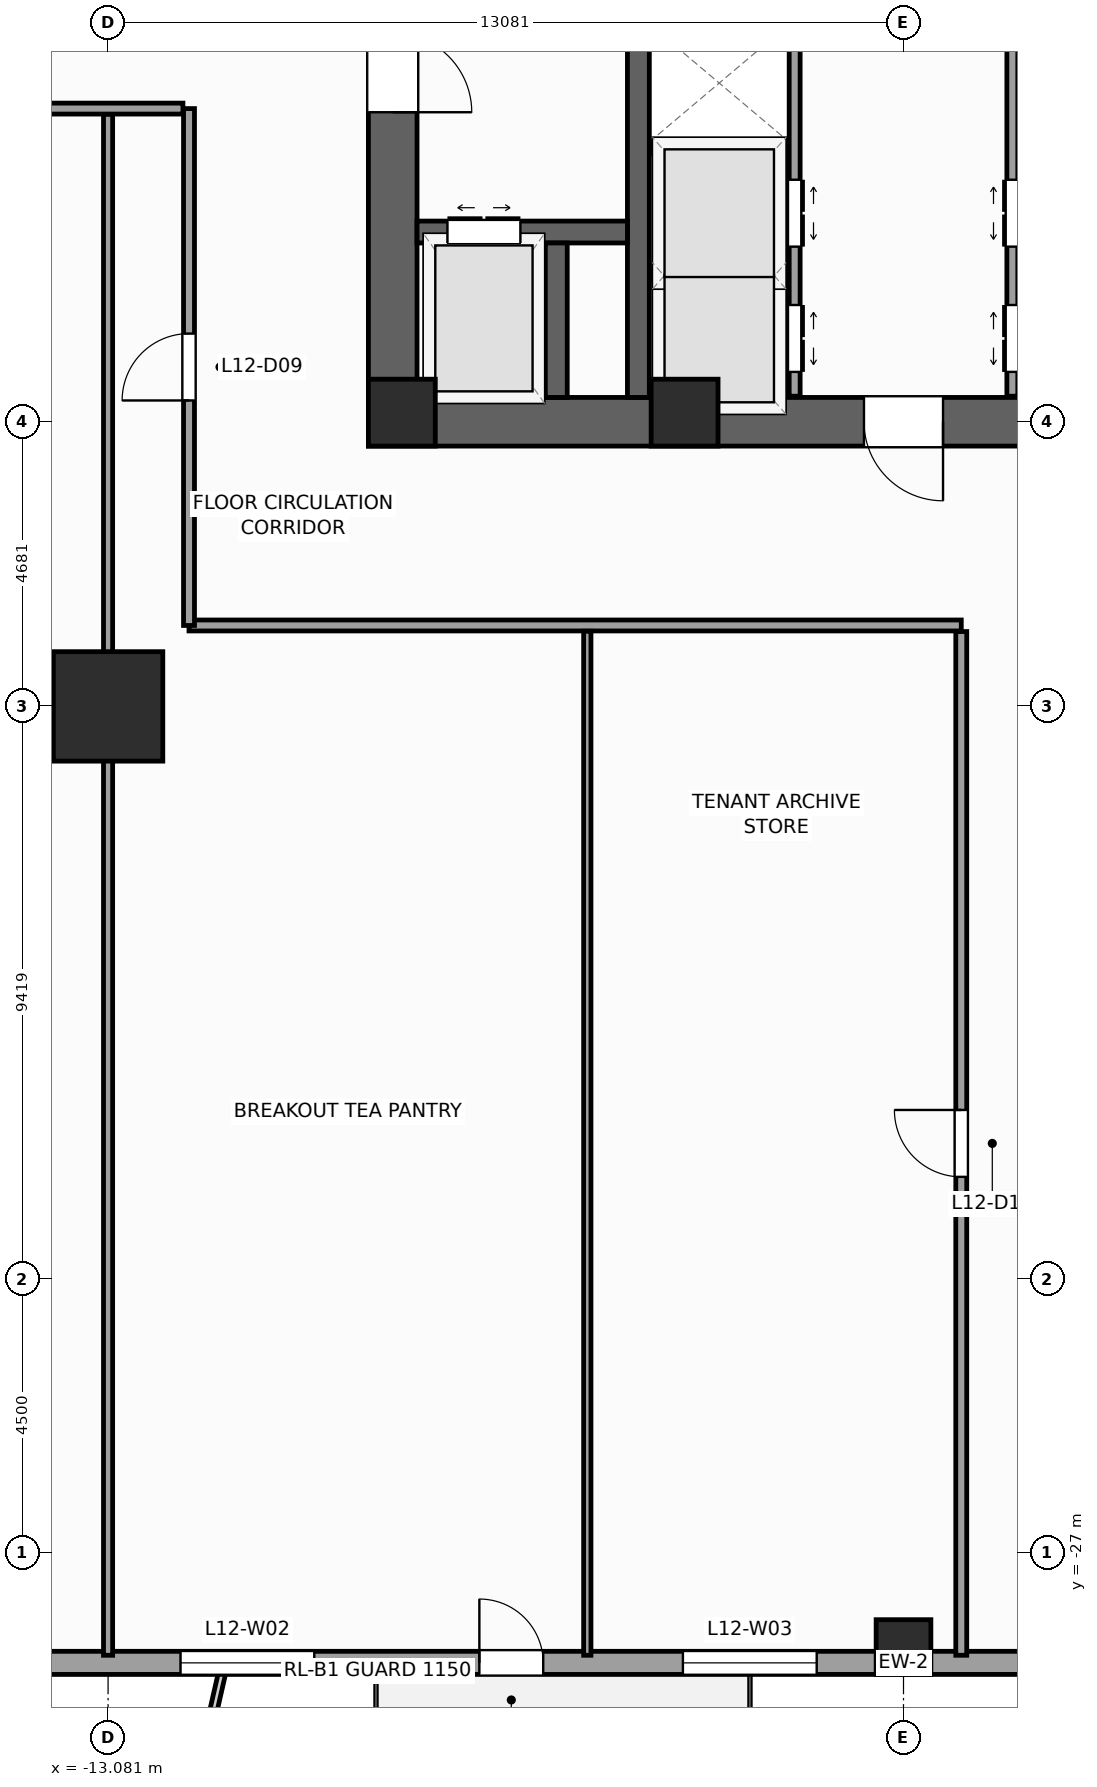
"""IFC4 building model, lengths in metres.
Left out: names, types, materials, properties, quantities, classifications, styles, units other than length and angle.
Written with IfcOpenShell. Run it as: python <this file> out.ifc"""

import sys

from ifc_helpers import new_model, si_unit, direction, frame, frame_2d, origin, origin_2d, place, context, subcontext, project, spatial, rectangle, extrude, source, transform, mapped, element, fill, save


model = new_model("IFC4")
c1 = context("Model", 3, precision=1e-05, world=origin(), true_north=direction((0.0, 1.0)))
c2 = subcontext(c1, "Body", "Model", "MODEL_VIEW")
j1 = project(units=[si_unit("LENGTHUNIT", "METRE"), si_unit("PLANEANGLEUNIT", "RADIAN")], contexts=[c1])
p1 = place(None, origin())
s1 = spatial("IfcSite", under=j1, at=p1, CompositionType="ELEMENT")
p2 = place(p1, origin())
s2 = spatial("IfcBuilding", under=s1, at=p2, CompositionType="ELEMENT")
p3 = place(p2, frame((0.0, 0.0, 54.0)))
s3 = spatial("IfcBuildingStorey", under=s2, at=p3, CompositionType="ELEMENT", Elevation=54.0)
p4 = place(p3, frame((-8.8, -8.4, 0.0), z_axis=(0.0, 0.0, 1.0), x_axis=(1.0, 0.0, 0.0)))
e1 = element("IfcWall", 1, at=p4, inside=s3, PredefinedType="SHEAR", context=c2, shape_type="SweptSolid", body=[
    extrude(rectangle(XDim=17.6, YDim=0.8, at=frame_2d((8.8, 0.0))), origin(), (0.0, 0.0, 1.0), 4.0),
])
p5 = place(p4, frame((8.15, 0.0, 0.0)))
e2 = element("IfcOpeningElement", 2, at=p5, cuts=e1, PredefinedType="OPENING", context=c2, shape_type="SweptSolid", body=[
    extrude(rectangle(XDim=1.3, YDim=2.2, at=frame_2d((0.65, 1.1))), frame((0.0, 0.41, 0.0), z_axis=(0.0, -1.0, 0.0), x_axis=(1.0, 0.0, 0.0)), (0.0, 0.0, 1.0), 0.82),
])
p6 = place(p3, frame((-8.4, -8.0, 0.0), z_axis=(0.0, 0.0, 1.0), x_axis=(0.0, 1.0, 0.0)))
e3 = element("IfcWall", 3, at=p6, inside=s3, PredefinedType="SHEAR", context=c2, shape_type="SweptSolid", body=[
    extrude(rectangle(XDim=16.0, YDim=0.8, at=frame_2d((8.0, 0.0))), origin(), (0.0, 0.0, 1.0), 4.0),
])
p7 = place(p6, frame((4.69, 0.0, 0.0)))
e4 = element("IfcOpeningElement", 4, at=p7, cuts=e3, PredefinedType="OPENING", context=c2, shape_type="SweptSolid", body=[
    extrude(rectangle(XDim=1.3, YDim=2.2, at=frame_2d((0.65, 1.1))), frame((0.0, 0.41, 0.0), z_axis=(0.0, -1.0, 0.0), x_axis=(1.0, 0.0, 0.0)), (0.0, 0.0, 1.0), 0.82),
])
p8 = place(p3, frame((-4.36, -8.0, 0.0), z_axis=(0.0, 0.0, 1.0), x_axis=(0.0, 1.0, 0.0)))
e5 = element("IfcWall", 5, at=p8, inside=s3, PredefinedType="SHEAR", context=c2, shape_type="SweptSolid", body=[
    extrude(rectangle(XDim=16.0, YDim=0.36, at=frame_2d((8.0, 0.0))), origin(), (0.0, 0.0, 1.0), 4.0),
])
p9 = place(p3, frame((-8.0, -5.28, 0.0), z_axis=(0.0, 0.0, 1.0), x_axis=(1.0, 0.0, 0.0)))
e6 = element("IfcWall", 6, at=p9, inside=s3, PredefinedType="SHEAR", context=c2, shape_type="SweptSolid", body=[
    extrude(rectangle(XDim=3.46, YDim=0.36, at=frame_2d((1.73, 0.0))), origin(), (0.0, 0.0, 1.0), 4.0),
])
p10 = place(p9, frame((0.5, 0.0, 0.0)))
e7 = element("IfcOpeningElement", 7, at=p10, cuts=e6, PredefinedType="OPENING", context=c2, shape_type="SweptSolid", body=[
    extrude(rectangle(XDim=1.2, YDim=2.25, at=frame_2d((0.6, 1.125))), frame((0.0, 0.19, 0.0), z_axis=(0.0, -1.0, 0.0), x_axis=(1.0, 0.0, 0.0)), (0.0, 0.0, 1.0), 0.38),
])
p11 = place(p3, frame((-5.71, -8.0, 0.0), z_axis=(0.0, 0.0, 1.0), x_axis=(0.0, 1.0, 0.0)))
e8 = element("IfcWall", 8, at=p11, inside=s3, PredefinedType="SHEAR", context=c2, shape_type="SweptSolid", body=[
    extrude(rectangle(XDim=2.54, YDim=0.36, at=frame_2d((1.27, 0.0))), origin(), (0.0, 0.0, 1.0), 4.0),
])
m1 = source(origin(), c2, "Body", "SweptSolid", [
    extrude(rectangle(XDim=1.1, YDim=1.1, at=origin_2d()), origin(), (0.0, 0.0, 1.0), 4.0),
])
for number, where, z_axis, x_axis in (
    (9, (-8.25, -8.25, 0.0), (0.0, 0.0, 1.0), (1.0, 0.0, 0.0)),
    (10, (-3.6, -8.25, 0.0), (0.0, 0.0, 1.0), (1.0, 0.0, 0.0)),
):
    element("IfcColumn", number, at=place(p3, frame(where, z_axis=z_axis, x_axis=x_axis)), inside=s3, PredefinedType="PILASTER", context=c2, shape_type="MappedRepresentation", body=[
        mapped(m1, transform((0.0, 0.0, 0.0), scale=1.0)),
    ])
m2 = source(origin(), c2, "Body", "SweptSolid", [
    extrude(rectangle(XDim=1.8, YDim=1.8, at=origin_2d()), origin(), (0.0, 0.0, 1.0), 4.0),
])
p12 = place(p3, frame((-13.081, -13.081, 0.0), z_axis=(0.0, 0.0, 1.0), x_axis=(1.0, 0.0, 0.0)))
e11 = element("IfcColumn", 11, at=p12, inside=s3, PredefinedType="COLUMN", context=c2, shape_type="MappedRepresentation", body=[
    mapped(m2, transform((0.0, 0.0, 0.0), scale=1.0)),
])
m3 = source(origin(), c2, "Body", "SweptSolid", [
    extrude(rectangle(XDim=0.9, YDim=0.9, at=origin_2d()), origin(), (0.0, 0.0, 1.0), 4.0),
])
p13 = place(p3, frame((0.0, -28.55, 0.0), z_axis=(0.0, 0.0, 1.0), x_axis=(1.0, 0.0, 0.0)))
e12 = element("IfcColumn", 12, at=p13, inside=s3, PredefinedType="COLUMN", context=c2, shape_type="MappedRepresentation", body=[
    mapped(m3, transform((0.0, 0.0, 0.0), scale=1.0)),
])
p14 = place(p3, frame((-25.69, -28.81, 0.0), z_axis=(0.0, 0.0, 1.0), x_axis=(1.0, 0.0, 0.0)))
e13 = element("IfcWall", 13, at=p14, inside=s3, PredefinedType="STANDARD", context=c2, shape_type="SweptSolid", body=[
    extrude(rectangle(XDim=51.38, YDim=0.38, at=frame_2d((25.69, 0.0))), origin(), (0.0, 0.0, 1.0), 3.12),
])
p15 = place(p14, frame((18.715, 0.0, 0.0)))
e14 = element("IfcOpeningElement", 14, at=p15, cuts=e13, PredefinedType="OPENING", context=c2, shape_type="SweptSolid", body=[
    extrude(rectangle(XDim=1.05, YDim=2.25, at=frame_2d((0.525, 1.125))), frame((0.0, 0.2, 0.0), z_axis=(0.0, -1.0, 0.0), x_axis=(1.0, 0.0, 0.0)), (0.0, 0.0, 1.0), 0.4),
])
p16 = place(p14, frame((5.466, 0.0, 0.49)))
e15 = element("IfcOpeningElement", 15, at=p16, cuts=e13, PredefinedType="OPENING", context=c2, shape_type="SweptSolid", body=[
    extrude(rectangle(XDim=1.4, YDim=2.4, at=frame_2d((0.7, 1.2))), frame((0.0, 0.2, 0.0), z_axis=(0.0, -1.0, 0.0), x_axis=(1.0, 0.0, 0.0)), (0.0, 0.0, 1.0), 0.4),
])
p17 = place(p14, frame((13.8, 0.0, 0.49)))
e16 = element("IfcOpeningElement", 16, at=p17, cuts=e13, PredefinedType="OPENING", context=c2, shape_type="SweptSolid", body=[
    extrude(rectangle(XDim=2.2, YDim=2.4, at=frame_2d((1.1, 1.2))), frame((0.0, 0.2, 0.0), z_axis=(0.0, -1.0, 0.0), x_axis=(1.0, 0.0, 0.0)), (0.0, 0.0, 1.0), 0.4),
])
p18 = place(p14, frame((22.062, 0.0, 0.49)))
e17 = element("IfcOpeningElement", 17, at=p18, cuts=e13, PredefinedType="OPENING", context=c2, shape_type="SweptSolid", body=[
    extrude(rectangle(XDim=2.2, YDim=2.4, at=frame_2d((1.1, 1.2))), frame((0.0, 0.2, 0.0), z_axis=(0.0, -1.0, 0.0), x_axis=(1.0, 0.0, 0.0)), (0.0, 0.0, 1.0), 0.4),
])
p19 = place(p14, frame((33.838, 0.0, 0.49)))
e18 = element("IfcOpeningElement", 18, at=p19, cuts=e13, PredefinedType="OPENING", context=c2, shape_type="SweptSolid", body=[
    extrude(rectangle(XDim=2.2, YDim=2.4, at=frame_2d((1.1, 1.2))), frame((0.0, 0.2, 0.0), z_axis=(0.0, -1.0, 0.0), x_axis=(1.0, 0.0, 0.0)), (0.0, 0.0, 1.0), 0.4),
])
p20 = place(p14, frame((43.487, 0.0, 0.49)))
e19 = element("IfcOpeningElement", 19, at=p20, cuts=e13, PredefinedType="OPENING", context=c2, shape_type="SweptSolid", body=[
    extrude(rectangle(XDim=1.4, YDim=2.4, at=frame_2d((0.7, 1.2))), frame((0.0, 0.2, 0.0), z_axis=(0.0, -1.0, 0.0), x_axis=(1.0, 0.0, 0.0)), (0.0, 0.0, 1.0), 0.4),
])
p21 = place(p3, frame((-1.79, -7.98, 0.0), z_axis=(0.0, 0.0, 1.0), x_axis=(0.0, 1.0, 0.0)))
e20 = element("IfcWall", 20, at=p21, inside=s3, PredefinedType="PARTITIONING", context=c2, shape_type="SweptSolid", body=[
    extrude(rectangle(XDim=12.38, YDim=0.18, at=frame_2d((6.19, 0.0))), origin(), (0.0, 0.0, 1.0), 3.72),
])
p22 = place(p21, frame((0.4, 0.0, 0.0)))
e21 = element("IfcOpeningElement", 21, at=p22, cuts=e20, PredefinedType="OPENING", context=c2, shape_type="SweptSolid", body=[
    extrude(rectangle(XDim=1.1, YDim=2.2, at=frame_2d((0.55, 1.1))), frame((0.0, 0.1, 0.0), z_axis=(0.0, -1.0, 0.0), x_axis=(1.0, 0.0, 0.0)), (0.0, 0.0, 1.0), 0.2),
])
p23 = place(p21, frame((2.46, 0.0, 0.0)))
e22 = element("IfcOpeningElement", 22, at=p23, cuts=e20, PredefinedType="OPENING", context=c2, shape_type="SweptSolid", body=[
    extrude(rectangle(XDim=1.1, YDim=2.2, at=frame_2d((0.55, 1.1))), frame((0.0, 0.1, 0.0), z_axis=(0.0, -1.0, 0.0), x_axis=(1.0, 0.0, 0.0)), (0.0, 0.0, 1.0), 0.2),
])
p24 = place(p3, frame((1.79, -7.98, 0.0), z_axis=(0.0, 0.0, 1.0), x_axis=(0.0, 1.0, 0.0)))
e23 = element("IfcWall", 23, at=p24, inside=s3, PredefinedType="PARTITIONING", context=c2, shape_type="SweptSolid", body=[
    extrude(rectangle(XDim=12.38, YDim=0.18, at=frame_2d((6.19, 0.0))), origin(), (0.0, 0.0, 1.0), 3.72),
])
p25 = place(p24, frame((0.4, 0.0, 0.0)))
e24 = element("IfcOpeningElement", 24, at=p25, cuts=e23, PredefinedType="OPENING", context=c2, shape_type="SweptSolid", body=[
    extrude(rectangle(XDim=1.1, YDim=2.2, at=frame_2d((0.55, 1.1))), frame((0.0, 0.1, 0.0), z_axis=(0.0, -1.0, 0.0), x_axis=(1.0, 0.0, 0.0)), (0.0, 0.0, 1.0), 0.2),
])
p26 = place(p24, frame((2.46, 0.0, 0.0)))
e25 = element("IfcOpeningElement", 25, at=p26, cuts=e23, PredefinedType="OPENING", context=c2, shape_type="SweptSolid", body=[
    extrude(rectangle(XDim=1.1, YDim=2.2, at=frame_2d((0.55, 1.1))), frame((0.0, 0.1, 0.0), z_axis=(0.0, -1.0, 0.0), x_axis=(1.0, 0.0, 0.0)), (0.0, 0.0, 1.0), 0.2),
])
p27 = place(p3, frame((-4.17, -3.9, 0.0), z_axis=(0.0, 0.0, 1.0), x_axis=(1.0, 0.0, 0.0)))
e26 = element("IfcWall", 26, at=p27, inside=s3, PredefinedType="PARTITIONING", context=c2, shape_type="SweptSolid", body=[
    extrude(rectangle(XDim=2.28, YDim=0.18, at=frame_2d((1.14, 0.0))), origin(), (0.0, 0.0, 1.0), 3.72),
])
p28 = place(p3, frame((-4.16, -6.0, 0.0), z_axis=(0.0, 0.0, 1.0), x_axis=(1.0, 0.0, 0.0)))
e27 = element("IfcWall", 27, at=p28, inside=s3, PredefinedType="PARTITIONING", context=c2, shape_type="SweptSolid", body=[
    extrude(rectangle(XDim=2.26, YDim=0.12, at=frame_2d((1.13, 0.0))), origin(), (0.0, 0.0, 1.0), 3.72),
])
p29 = place(p3, frame((-11.75, -11.75, 0.0), z_axis=(0.0, 0.0, 1.0), x_axis=(1.0, 0.0, 0.0)))
e28 = element("IfcWall", 28, at=p29, inside=s3, PredefinedType="PARTITIONING", context=c2, shape_type="SweptSolid", body=[
    extrude(rectangle(XDim=12.7, YDim=0.18, at=frame_2d((6.35, 0.0))), origin(), (0.0, 0.0, 1.0), 3.72),
])
p30 = place(p3, frame((-11.75, -11.75, 0.0), z_axis=(0.0, 0.0, 1.0), x_axis=(0.0, 1.0, 0.0)))
e29 = element("IfcWall", 29, at=p30, inside=s3, PredefinedType="PARTITIONING", context=c2, shape_type="SweptSolid", body=[
    extrude(rectangle(XDim=8.5, YDim=0.18, at=frame_2d((4.25, 0.0))), origin(), (0.0, 0.0, 1.0), 3.72),
])
p31 = place(p30, frame((3.7, 0.0, 0.0)))
e30 = element("IfcOpeningElement", 30, at=p31, cuts=e29, PredefinedType="OPENING", context=c2, shape_type="SweptSolid", body=[
    extrude(rectangle(XDim=1.1, YDim=2.2, at=frame_2d((0.55, 1.1))), frame((0.0, 0.1, 0.0), z_axis=(0.0, -1.0, 0.0), x_axis=(1.0, 0.0, 0.0)), (0.0, 0.0, 1.0), 0.2),
])
p32 = place(p3, frame((-28.685, -3.25, 0.0), z_axis=(0.0, 0.0, 1.0), x_axis=(1.0, 0.0, 0.0)))
e31 = element("IfcWall", 31, at=p32, inside=s3, PredefinedType="PARTITIONING", context=c2, shape_type="SweptSolid", body=[
    extrude(rectangle(XDim=16.835, YDim=0.18, at=frame_2d((8.417, 0.0))), origin(), (0.0, 0.0, 1.0), 3.39),
])
p33 = place(p32, frame((7.417, 0.0, 0.0)))
e32 = element("IfcOpeningElement", 32, at=p33, cuts=e31, PredefinedType="OPENING", context=c2, shape_type="SweptSolid", body=[
    extrude(rectangle(XDim=1.1, YDim=2.2, at=frame_2d((0.55, 1.1))), frame((0.0, 0.1, 0.0), z_axis=(0.0, -1.0, 0.0), x_axis=(1.0, 0.0, 0.0)), (0.0, 0.0, 1.0), 0.2),
])
p34 = place(p3, frame((0.95, -28.685, 0.0), z_axis=(0.0, 0.0, 1.0), x_axis=(0.0, 1.0, 0.0)))
e33 = element("IfcWall", 33, at=p34, inside=s3, PredefinedType="PARTITIONING", context=c2, shape_type="SweptSolid", body=[
    extrude(rectangle(XDim=16.835, YDim=0.18, at=frame_2d((8.417, 0.0))), origin(), (0.0, 0.0, 1.0), 3.72),
])
p35 = place(p34, frame((7.867, 0.0, 0.0)))
e34 = element("IfcOpeningElement", 34, at=p35, cuts=e33, PredefinedType="OPENING", context=c2, shape_type="SweptSolid", body=[
    extrude(rectangle(XDim=1.1, YDim=2.2, at=frame_2d((0.55, 1.1))), frame((0.0, 0.1, 0.0), z_axis=(0.0, -1.0, 0.0), x_axis=(1.0, 0.0, 0.0)), (0.0, 0.0, 1.0), 0.2),
])
p36 = place(p3, frame((-13.081, -28.685, 0.0), z_axis=(0.0, 0.0, 1.0), x_axis=(0.0, 1.0, 0.0)))
e35 = element("IfcWall", 35, at=p36, inside=s3, PredefinedType="PARTITIONING", context=c2, shape_type="SweptSolid", body=[
    extrude(rectangle(XDim=25.34, YDim=0.15, at=frame_2d((12.67, 0.0))), origin(), (0.0, 0.0, 1.0), 2.712),
])
p37 = place(p3, frame((-5.2, -28.685, 0.0), z_axis=(0.0, 0.0, 1.0), x_axis=(0.0, 1.0, 0.0)))
e36 = element("IfcWall", 36, at=p37, inside=s3, PredefinedType="PARTITIONING", context=c2, shape_type="SweptSolid", body=[
    extrude(rectangle(XDim=16.84, YDim=0.12, at=frame_2d((8.42, 0.0))), origin(), (0.0, 0.0, 1.0), 3.72),
])
m4 = source(origin(), c2, "Body", "SweptSolid", [
    extrude(rectangle(XDim=1.05, YDim=2.25, at=frame_2d((0.525, 1.125))), frame((0.0, 0.025, 0.0), z_axis=(0.0, -1.0, 0.0), x_axis=(1.0, 0.0, 0.0)), (0.0, 0.0, 1.0), 0.05),
])
p38 = place(p15, origin())
e37 = element("IfcDoor", 37, at=p38, inside=s3, OperationType="SINGLE_SWING_LEFT", PredefinedType="DOOR", context=c2, shape_type="MappedRepresentation", body=[
    mapped(m4, transform((0.0, 0.0, 0.0), scale=1.0)),
])
fill(e14, e37)
m5 = source(origin(), c2, "Body", "SweptSolid", [
    extrude(rectangle(XDim=2.2, YDim=2.4, at=frame_2d((1.1, 1.2))), frame((0.0, 0.03, 0.0), z_axis=(0.0, -1.0, 0.0), x_axis=(1.0, 0.0, 0.0)), (0.0, 0.0, 1.0), 0.06),
])
p39 = place(p17, origin())
e38 = element("IfcWindow", 38, at=p39, inside=s3, PartitioningType="SINGLE_PANEL", PredefinedType="WINDOW", context=c2, shape_type="MappedRepresentation", body=[
    mapped(m5, transform((0.0, 0.0, 0.0), scale=1.0)),
])
fill(e16, e38)
p40 = place(p18, origin())
e39 = element("IfcWindow", 39, at=p40, inside=s3, PartitioningType="SINGLE_PANEL", PredefinedType="WINDOW", context=c2, shape_type="MappedRepresentation", body=[
    mapped(m5, transform((0.0, 0.0, 0.0), scale=1.0)),
])
fill(e17, e39)
m6 = source(origin(), c2, "Body", "SweptSolid", [
    extrude(rectangle(XDim=1.3, YDim=2.2, at=frame_2d((0.65, 1.1))), frame((0.0, 0.025, 0.0), z_axis=(0.0, -1.0, 0.0), x_axis=(1.0, 0.0, 0.0)), (0.0, 0.0, 1.0), 0.05),
])
p41 = place(p7, frame((1.3, 0.0, 0.0), z_axis=(0.0, 0.0, 1.0), x_axis=(-1.0, 0.0, 0.0)))
e40 = element("IfcDoor", 40, at=p41, inside=s3, OperationType="SINGLE_SWING_LEFT", PredefinedType="DOOR", context=c2, shape_type="MappedRepresentation", body=[
    mapped(m6, transform((0.0, 0.0, 0.0), scale=1.0)),
])
fill(e4, e40)
p42 = place(p5, frame((1.3, 0.0, 0.0), z_axis=(0.0, 0.0, 1.0), x_axis=(-1.0, 0.0, 0.0)))
e41 = element("IfcDoor", 41, at=p42, inside=s3, OperationType="SINGLE_SWING_RIGHT", PredefinedType="DOOR", context=c2, shape_type="MappedRepresentation", body=[
    mapped(m6, transform((0.0, 0.0, 0.0), scale=1.0)),
])
fill(e2, e41)
m7 = source(origin(), c2, "Body", "SweptSolid", [
    extrude(rectangle(XDim=1.2, YDim=2.25, at=frame_2d((0.6, 1.125))), frame((0.0, 0.025, 0.0), z_axis=(0.0, -1.0, 0.0), x_axis=(1.0, 0.0, 0.0)), (0.0, 0.0, 1.0), 0.05),
])
p43 = place(p10, origin())
e42 = element("IfcDoor", 42, at=p43, inside=s3, OperationType="DOUBLE_DOOR_SLIDING", PredefinedType="DOOR", context=c2, shape_type="MappedRepresentation", body=[
    mapped(m7, transform((0.0, 0.0, 0.0), scale=1.0)),
])
fill(e7, e42)
m8 = source(origin(), c2, "Body", "SweptSolid", [
    extrude(rectangle(XDim=1.1, YDim=2.2, at=frame_2d((0.55, 1.1))), frame((0.0, 0.025, 0.0), z_axis=(0.0, -1.0, 0.0), x_axis=(1.0, 0.0, 0.0)), (0.0, 0.0, 1.0), 0.05),
])
p44 = place(p22, frame((1.1, 0.0, 0.0), z_axis=(0.0, 0.0, 1.0), x_axis=(-1.0, 0.0, 0.0)))
e43 = element("IfcDoor", 43, at=p44, inside=s3, OperationType="DOUBLE_DOOR_SLIDING", PredefinedType="DOOR", context=c2, shape_type="MappedRepresentation", body=[
    mapped(m8, transform((0.0, 0.0, 0.0), scale=1.0)),
])
fill(e21, e43)
p45 = place(p23, frame((1.1, 0.0, 0.0), z_axis=(0.0, 0.0, 1.0), x_axis=(-1.0, 0.0, 0.0)))
e44 = element("IfcDoor", 44, at=p45, inside=s3, OperationType="DOUBLE_DOOR_SLIDING", PredefinedType="DOOR", context=c2, shape_type="MappedRepresentation", body=[
    mapped(m8, transform((0.0, 0.0, 0.0), scale=1.0)),
])
fill(e22, e44)
p46 = place(p25, origin())
e45 = element("IfcDoor", 45, at=p46, inside=s3, OperationType="DOUBLE_DOOR_SLIDING", PredefinedType="DOOR", context=c2, shape_type="MappedRepresentation", body=[
    mapped(m8, transform((0.0, 0.0, 0.0), scale=1.0)),
])
fill(e24, e45)
p47 = place(p26, origin())
e46 = element("IfcDoor", 46, at=p47, inside=s3, OperationType="DOUBLE_DOOR_SLIDING", PredefinedType="DOOR", context=c2, shape_type="MappedRepresentation", body=[
    mapped(m8, transform((0.0, 0.0, 0.0), scale=1.0)),
])
fill(e25, e46)
p48 = place(p31, origin())
e47 = element("IfcDoor", 47, at=p48, inside=s3, OperationType="SINGLE_SWING_LEFT", PredefinedType="DOOR", context=c2, shape_type="MappedRepresentation", body=[
    mapped(m8, transform((0.0, 0.0, 0.0), scale=1.0)),
])
fill(e30, e47)
p49 = place(p35, origin())
e48 = element("IfcDoor", 48, at=p49, inside=s3, OperationType="SINGLE_SWING_RIGHT", PredefinedType="DOOR", context=c2, shape_type="MappedRepresentation", body=[
    mapped(m8, transform((0.0, 0.0, 0.0), scale=1.0)),
])
fill(e34, e48)
save(model, sys.argv[1])
